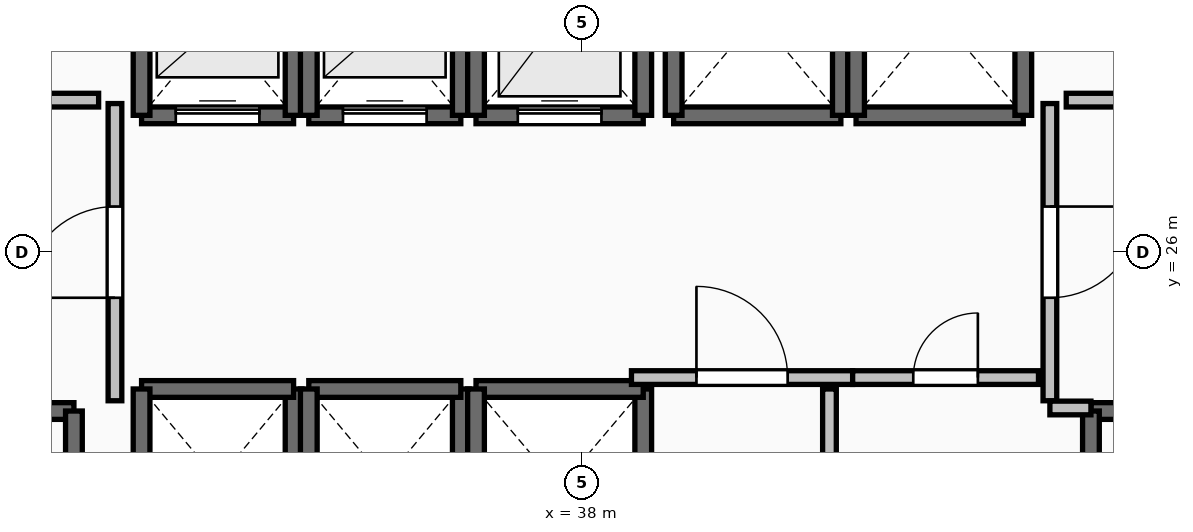
"""IFC4 building model, lengths in metres.
Left out: names, types, materials, properties, quantities, classifications, styles, units other than length and angle.
Written with IfcOpenShell. Run it as: python <this file> out.ifc"""

import sys

from ifc_helpers import new_model, si_unit, direction, frame, frame_2d, origin, place, context, subcontext, project, spatial, rectangle, extrude, element, fill, save


model = new_model("IFC4")
c1 = context("Model", 3, precision=1e-05, world=origin(), true_north=direction((0.0, 1.0)))
c2 = subcontext(c1, "Body", "Model", "MODEL_VIEW")
j1 = project(units=[si_unit("LENGTHUNIT", "METRE"), si_unit("PLANEANGLEUNIT", "RADIAN")], contexts=[c1])
p1 = place(None, origin())
s1 = spatial("IfcSite", under=j1, at=p1, CompositionType="ELEMENT")
p2 = place(p1, origin())
s2 = spatial("IfcBuilding", under=s1, at=p2, CompositionType="ELEMENT")
p3 = place(p2, frame((0.0, 0.0, 52.0)))
s3 = spatial("IfcBuildingStorey", under=s2, at=p3, CompositionType="ELEMENT", Elevation=52.0)
p4 = place(p3, frame((27.94, 23.91, 0.0), z_axis=(0.0, 0.0, 1.0), x_axis=(1.0, 0.0, 0.0)))
e1 = element("IfcWall", 1, at=p4, inside=s3, PredefinedType="SOLIDWALL", context=c2, shape_type="SweptSolid", body=[
    extrude(rectangle(XDim=3.37, YDim=0.22, at=frame_2d((1.685, 0.0))), origin(), (0.0, 0.0, 1.0), 3.24),
])
p5 = place(p4, frame((1.135, 0.0, 0.0)))
e2 = element("IfcOpeningElement", 2, at=p5, cuts=e1, PredefinedType="OPENING", context=c2, shape_type="SweptSolid", body=[
    extrude(rectangle(XDim=1.1, YDim=2.15, at=frame_2d((0.55, 1.075))), frame((0.0, 0.125, 0.0), z_axis=(0.0, -1.0, 0.0), x_axis=(1.0, 0.0, 0.0)), (0.0, 0.0, 1.0), 0.25),
])
p6 = place(p3, frame((31.31, 23.91, 0.0), z_axis=(0.0, 0.0, 1.0), x_axis=(0.0, -1.0, 0.0)))
e3 = element("IfcWall", 3, at=p6, inside=s3, PredefinedType="SOLIDWALL", context=c2, shape_type="SweptSolid", body=[
    extrude(rectangle(XDim=7.42, YDim=0.22, at=frame_2d((3.71, 0.0))), origin(), (0.0, 0.0, 1.0), 3.24),
])
p7 = place(p3, frame((44.69, 23.91, 0.0), z_axis=(0.0, 0.0, 1.0), x_axis=(1.0, 0.0, 0.0)))
e4 = element("IfcWall", 4, at=p7, inside=s3, PredefinedType="SOLIDWALL", context=c2, shape_type="SweptSolid", body=[
    extrude(rectangle(XDim=3.37, YDim=0.22, at=frame_2d((1.685, 0.0))), origin(), (0.0, 0.0, 1.0), 3.24),
])
p8 = place(p7, frame((1.135, 0.0, 0.0)))
e5 = element("IfcOpeningElement", 5, at=p8, cuts=e4, PredefinedType="OPENING", context=c2, shape_type="SweptSolid", body=[
    extrude(rectangle(XDim=1.1, YDim=2.15, at=frame_2d((0.55, 1.075))), frame((0.0, 0.125, 0.0), z_axis=(0.0, -1.0, 0.0), x_axis=(1.0, 0.0, 0.0)), (0.0, 0.0, 1.0), 0.25),
])
p9 = place(p3, frame((44.69, 16.49, 0.0), z_axis=(0.0, 0.0, 1.0), x_axis=(0.0, 1.0, 0.0)))
e6 = element("IfcWall", 6, at=p9, inside=s3, PredefinedType="SOLIDWALL", context=c2, shape_type="SweptSolid", body=[
    extrude(rectangle(XDim=7.42, YDim=0.22, at=frame_2d((3.71, 0.0))), origin(), (0.0, 0.0, 1.0), 3.24),
])
p10 = place(p3, frame((32.2, 27.8, 0.0), z_axis=(0.0, 0.0, 1.0), x_axis=(1.0, 0.0, 0.0)))
e7 = element("IfcWall", 7, at=p10, inside=s3, PredefinedType="SOLIDWALL", context=c2, shape_type="SweptSolid", body=[
    extrude(rectangle(XDim=2.0, YDim=0.22, at=frame_2d((1.0, 0.0))), origin(), (0.0, 0.0, 1.0), 3.24),
])
p11 = place(p10, frame((0.45, 0.0, 0.0)))
e8 = element("IfcOpeningElement", 8, at=p11, cuts=e7, PredefinedType="OPENING", context=c2, shape_type="SweptSolid", body=[
    extrude(rectangle(XDim=1.1, YDim=2.2, at=frame_2d((0.55, 1.1))), frame((0.0, 0.125, 0.0), z_axis=(0.0, -1.0, 0.0), x_axis=(1.0, 0.0, 0.0)), (0.0, 0.0, 1.0), 0.25),
])
for number, where, z_axis, x_axis in (
    (9, (34.2, 27.8, 0.0), (0.0, 0.0, 1.0), (0.0, 1.0, 0.0)),
    (10, (32.2, 30.2, 0.0), (0.0, 0.0, 1.0), (0.0, -1.0, 0.0)),
):
    element("IfcWall", number, at=place(p3, frame(where, z_axis=z_axis, x_axis=x_axis)), inside=s3, PredefinedType="SOLIDWALL", context=c2, shape_type="SweptSolid", body=[
        extrude(rectangle(XDim=2.4, YDim=0.22, at=frame_2d((1.2, 0.0))), origin(), (0.0, 0.0, 1.0), 3.24),
    ])
p12 = place(p3, frame((34.4, 27.8, 0.0), z_axis=(0.0, 0.0, 1.0), x_axis=(1.0, 0.0, 0.0)))
e11 = element("IfcWall", 11, at=p12, inside=s3, PredefinedType="SOLIDWALL", context=c2, shape_type="SweptSolid", body=[
    extrude(rectangle(XDim=2.0, YDim=0.22, at=frame_2d((1.0, 0.0))), origin(), (0.0, 0.0, 1.0), 3.24),
])
p13 = place(p12, frame((0.45, 0.0, 0.0)))
e12 = element("IfcOpeningElement", 12, at=p13, cuts=e11, PredefinedType="OPENING", context=c2, shape_type="SweptSolid", body=[
    extrude(rectangle(XDim=1.1, YDim=2.2, at=frame_2d((0.55, 1.1))), frame((0.0, 0.125, 0.0), z_axis=(0.0, -1.0, 0.0), x_axis=(1.0, 0.0, 0.0)), (0.0, 0.0, 1.0), 0.25),
])
for number, where, z_axis, x_axis in (
    (13, (36.4, 27.8, 0.0), (0.0, 0.0, 1.0), (0.0, 1.0, 0.0)),
    (14, (34.4, 30.2, 0.0), (0.0, 0.0, 1.0), (0.0, -1.0, 0.0)),
):
    element("IfcWall", number, at=place(p3, frame(where, z_axis=z_axis, x_axis=x_axis)), inside=s3, PredefinedType="SOLIDWALL", context=c2, shape_type="SweptSolid", body=[
        extrude(rectangle(XDim=2.4, YDim=0.22, at=frame_2d((1.2, 0.0))), origin(), (0.0, 0.0, 1.0), 3.24),
    ])
p14 = place(p3, frame((36.6, 27.8, 0.0), z_axis=(0.0, 0.0, 1.0), x_axis=(1.0, 0.0, 0.0)))
e15 = element("IfcWall", 15, at=p14, inside=s3, PredefinedType="SOLIDWALL", context=c2, shape_type="SweptSolid", body=[
    extrude(rectangle(XDim=2.2, YDim=0.22, at=frame_2d((1.1, 0.0))), origin(), (0.0, 0.0, 1.0), 3.24),
])
p15 = place(p14, frame((0.55, 0.0, 0.0)))
e16 = element("IfcOpeningElement", 16, at=p15, cuts=e15, PredefinedType="OPENING", context=c2, shape_type="SweptSolid", body=[
    extrude(rectangle(XDim=1.1, YDim=2.2, at=frame_2d((0.55, 1.1))), frame((0.0, 0.125, 0.0), z_axis=(0.0, -1.0, 0.0), x_axis=(1.0, 0.0, 0.0)), (0.0, 0.0, 1.0), 0.25),
])
for number, where, z_axis, x_axis in (
    (17, (38.8, 27.8, 0.0), (0.0, 0.0, 1.0), (0.0, 1.0, 0.0)),
    (18, (36.6, 30.4, 0.0), (0.0, 0.0, 1.0), (0.0, -1.0, 0.0)),
):
    element("IfcWall", number, at=place(p3, frame(where, z_axis=z_axis, x_axis=x_axis)), inside=s3, PredefinedType="SOLIDWALL", context=c2, shape_type="SweptSolid", body=[
        extrude(rectangle(XDim=2.6, YDim=0.22, at=frame_2d((1.3, 0.0))), origin(), (0.0, 0.0, 1.0), 3.24),
    ])
p16 = place(p3, frame((34.2, 21.8, 0.0), z_axis=(0.0, 0.0, 1.0), x_axis=(0.0, 1.0, 0.0)))
e19 = element("IfcWall", 19, at=p16, inside=s3, PredefinedType="SOLIDWALL", context=c2, shape_type="SweptSolid", body=[
    extrude(rectangle(XDim=2.4, YDim=0.22, at=frame_2d((1.2, 0.0))), origin(), (0.0, 0.0, 1.0), 3.24),
])
p17 = place(p3, frame((34.2, 24.2, 0.0), z_axis=(0.0, 0.0, 1.0), x_axis=(-1.0, 0.0, 0.0)))
e20 = element("IfcWall", 20, at=p17, inside=s3, PredefinedType="SOLIDWALL", context=c2, shape_type="SweptSolid", body=[
    extrude(rectangle(XDim=2.0, YDim=0.22, at=frame_2d((1.0, 0.0))), origin(), (0.0, 0.0, 1.0), 3.24),
])
for number, where, z_axis, x_axis in (
    (21, (32.2, 24.2, 0.0), (0.0, 0.0, 1.0), (0.0, -1.0, 0.0)),
    (22, (36.4, 21.8, 0.0), (0.0, 0.0, 1.0), (0.0, 1.0, 0.0)),
):
    element("IfcWall", number, at=place(p3, frame(where, z_axis=z_axis, x_axis=x_axis)), inside=s3, PredefinedType="SOLIDWALL", context=c2, shape_type="SweptSolid", body=[
        extrude(rectangle(XDim=2.4, YDim=0.22, at=frame_2d((1.2, 0.0))), origin(), (0.0, 0.0, 1.0), 3.24),
    ])
p18 = place(p3, frame((36.4, 24.2, 0.0), z_axis=(0.0, 0.0, 1.0), x_axis=(-1.0, 0.0, 0.0)))
e23 = element("IfcWall", 23, at=p18, inside=s3, PredefinedType="SOLIDWALL", context=c2, shape_type="SweptSolid", body=[
    extrude(rectangle(XDim=2.0, YDim=0.22, at=frame_2d((1.0, 0.0))), origin(), (0.0, 0.0, 1.0), 3.24),
])
p19 = place(p3, frame((34.4, 24.2, 0.0), z_axis=(0.0, 0.0, 1.0), x_axis=(0.0, -1.0, 0.0)))
e24 = element("IfcWall", 24, at=p19, inside=s3, PredefinedType="SOLIDWALL", context=c2, shape_type="SweptSolid", body=[
    extrude(rectangle(XDim=2.4, YDim=0.22, at=frame_2d((1.2, 0.0))), origin(), (0.0, 0.0, 1.0), 3.24),
])
p20 = place(p3, frame((38.8, 21.6, 0.0), z_axis=(0.0, 0.0, 1.0), x_axis=(0.0, 1.0, 0.0)))
e25 = element("IfcWall", 25, at=p20, inside=s3, PredefinedType="SOLIDWALL", context=c2, shape_type="SweptSolid", body=[
    extrude(rectangle(XDim=2.6, YDim=0.22, at=frame_2d((1.3, 0.0))), origin(), (0.0, 0.0, 1.0), 3.24),
])
p21 = place(p3, frame((38.8, 24.2, 0.0), z_axis=(0.0, 0.0, 1.0), x_axis=(-1.0, 0.0, 0.0)))
e26 = element("IfcWall", 26, at=p21, inside=s3, PredefinedType="SOLIDWALL", context=c2, shape_type="SweptSolid", body=[
    extrude(rectangle(XDim=2.2, YDim=0.22, at=frame_2d((1.1, 0.0))), origin(), (0.0, 0.0, 1.0), 3.24),
])
p22 = place(p3, frame((36.6, 24.2, 0.0), z_axis=(0.0, 0.0, 1.0), x_axis=(0.0, -1.0, 0.0)))
e27 = element("IfcWall", 27, at=p22, inside=s3, PredefinedType="SOLIDWALL", context=c2, shape_type="SweptSolid", body=[
    extrude(rectangle(XDim=2.6, YDim=0.22, at=frame_2d((1.3, 0.0))), origin(), (0.0, 0.0, 1.0), 3.24),
])
p23 = place(p3, frame((39.2, 27.8, 0.0), z_axis=(0.0, 0.0, 1.0), x_axis=(1.0, 0.0, 0.0)))
e28 = element("IfcWall", 28, at=p23, inside=s3, PredefinedType="SOLIDWALL", context=c2, shape_type="SweptSolid", body=[
    extrude(rectangle(XDim=2.2, YDim=0.22, at=frame_2d((1.1, 0.0))), origin(), (0.0, 0.0, 1.0), 3.24),
])
for number, where, z_axis, x_axis in (
    (29, (41.4, 27.8, 0.0), (0.0, 0.0, 1.0), (0.0, 1.0, 0.0)),
    (30, (39.2, 30.4, 0.0), (0.0, 0.0, 1.0), (0.0, -1.0, 0.0)),
):
    element("IfcWall", number, at=place(p3, frame(where, z_axis=z_axis, x_axis=x_axis)), inside=s3, PredefinedType="SOLIDWALL", context=c2, shape_type="SweptSolid", body=[
        extrude(rectangle(XDim=2.6, YDim=0.22, at=frame_2d((1.3, 0.0))), origin(), (0.0, 0.0, 1.0), 3.24),
    ])
p24 = place(p3, frame((41.6, 27.8, 0.0), z_axis=(0.0, 0.0, 1.0), x_axis=(1.0, 0.0, 0.0)))
e31 = element("IfcWall", 31, at=p24, inside=s3, PredefinedType="SOLIDWALL", context=c2, shape_type="SweptSolid", body=[
    extrude(rectangle(XDim=2.2, YDim=0.22, at=frame_2d((1.1, 0.0))), origin(), (0.0, 0.0, 1.0), 3.24),
])
for number, where, z_axis, x_axis in (
    (32, (43.8, 27.8, 0.0), (0.0, 0.0, 1.0), (0.0, 1.0, 0.0)),
    (33, (41.6, 30.4, 0.0), (0.0, 0.0, 1.0), (0.0, -1.0, 0.0)),
):
    element("IfcWall", number, at=place(p3, frame(where, z_axis=z_axis, x_axis=x_axis)), inside=s3, PredefinedType="SOLIDWALL", context=c2, shape_type="SweptSolid", body=[
        extrude(rectangle(XDim=2.6, YDim=0.22, at=frame_2d((1.3, 0.0))), origin(), (0.0, 0.0, 1.0), 3.24),
    ])
p25 = place(p3, frame((31.85, 24.045, 0.0), z_axis=(0.0, 0.0, 1.0), x_axis=(0.0, 1.0, 0.0)))
e34 = element("IfcWall", 34, at=p25, inside=s3, PredefinedType="PARTITIONING", context=c2, shape_type="SweptSolid", body=[
    extrude(rectangle(XDim=3.91, YDim=0.18, at=frame_2d((1.955, 0.0))), origin(), (0.0, 0.0, 1.0), 3.24),
])
p26 = place(p25, frame((1.355, 0.0, 0.0)))
e35 = element("IfcOpeningElement", 35, at=p26, cuts=e34, PredefinedType="OPENING", context=c2, shape_type="SweptSolid", body=[
    extrude(rectangle(XDim=1.2, YDim=2.15, at=frame_2d((0.6, 1.075))), frame((0.0, 0.105, 0.0), z_axis=(0.0, -1.0, 0.0), x_axis=(1.0, 0.0, 0.0)), (0.0, 0.0, 1.0), 0.21),
])
p27 = place(p3, frame((44.15, 27.955, 0.0), z_axis=(0.0, 0.0, 1.0), x_axis=(0.0, -1.0, 0.0)))
e36 = element("IfcWall", 36, at=p27, inside=s3, PredefinedType="PARTITIONING", context=c2, shape_type="SweptSolid", body=[
    extrude(rectangle(XDim=3.91, YDim=0.18, at=frame_2d((1.955, 0.0))), origin(), (0.0, 0.0, 1.0), 3.24),
])
p28 = place(p27, frame((1.355, 0.0, 0.0)))
e37 = element("IfcOpeningElement", 37, at=p28, cuts=e36, PredefinedType="OPENING", context=c2, shape_type="SweptSolid", body=[
    extrude(rectangle(XDim=1.2, YDim=2.15, at=frame_2d((0.6, 1.075))), frame((0.0, 0.105, 0.0), z_axis=(0.0, -1.0, 0.0), x_axis=(1.0, 0.0, 0.0)), (0.0, 0.0, 1.0), 0.21),
])
p29 = place(p3, frame((44.15, 23.95, 0.0), z_axis=(0.0, 0.0, 1.0), x_axis=(1.0, 0.0, 0.0)))
e38 = element("IfcWall", 38, at=p29, inside=s3, PredefinedType="PARTITIONING", context=c2, shape_type="SweptSolid", body=[
    extrude(rectangle(XDim=0.54, YDim=0.18, at=frame_2d((0.27, 0.0))), origin(), (0.0, 0.0, 1.0), 3.24),
])
p30 = place(p3, frame((38.645, 24.35, 0.0), z_axis=(0.0, 0.0, 1.0), x_axis=(1.0, 0.0, 0.0)))
e39 = element("IfcWall", 39, at=p30, inside=s3, PredefinedType="PARTITIONING", context=c2, shape_type="SweptSolid", body=[
    extrude(rectangle(XDim=2.91, YDim=0.18, at=frame_2d((1.455, 0.0))), origin(), (0.0, 0.0, 1.0), 3.24),
])
p31 = place(p30, frame((0.855, 0.0, 0.0)))
e40 = element("IfcOpeningElement", 40, at=p31, cuts=e39, PredefinedType="OPENING", context=c2, shape_type="SweptSolid", body=[
    extrude(rectangle(XDim=1.2, YDim=2.15, at=frame_2d((0.6, 1.075))), frame((0.0, 0.105, 0.0), z_axis=(0.0, -1.0, 0.0), x_axis=(1.0, 0.0, 0.0)), (0.0, 0.0, 1.0), 0.21),
])
p32 = place(p3, frame((41.555, 24.35, 0.0), z_axis=(0.0, 0.0, 1.0), x_axis=(1.0, 0.0, 0.0)))
e41 = element("IfcWall", 41, at=p32, inside=s3, PredefinedType="PARTITIONING", context=c2, shape_type="SweptSolid", body=[
    extrude(rectangle(XDim=2.445, YDim=0.18, at=frame_2d((1.223, 0.0))), origin(), (0.0, 0.0, 1.0), 3.24),
])
p33 = place(p32, frame((0.798, 0.0, 0.0)))
e42 = element("IfcOpeningElement", 42, at=p33, cuts=e41, PredefinedType="OPENING", context=c2, shape_type="SweptSolid", body=[
    extrude(rectangle(XDim=0.85, YDim=2.1, at=frame_2d((0.425, 1.05))), frame((0.0, 0.105, 0.0), z_axis=(0.0, -1.0, 0.0), x_axis=(1.0, 0.0, 0.0)), (0.0, 0.0, 1.0), 0.21),
])
p34 = place(p3, frame((41.25, 20.305, 0.0), z_axis=(0.0, 0.0, 1.0), x_axis=(0.0, 1.0, 0.0)))
e43 = element("IfcWall", 43, at=p34, inside=s3, PredefinedType="PARTITIONING", context=c2, shape_type="SweptSolid", body=[
    extrude(rectangle(XDim=3.895, YDim=0.18, at=frame_2d((1.948, 0.0))), origin(), (0.0, 0.0, 1.0), 3.24),
])
p35 = place(p34, frame((1.522, 0.0, 0.0)))
e44 = element("IfcOpeningElement", 44, at=p35, cuts=e43, PredefinedType="OPENING", context=c2, shape_type="SweptSolid", body=[
    extrude(rectangle(XDim=0.85, YDim=2.1, at=frame_2d((0.425, 1.05))), frame((0.0, 0.105, 0.0), z_axis=(0.0, -1.0, 0.0), x_axis=(1.0, 0.0, 0.0)), (0.0, 0.0, 1.0), 0.21),
])
for number, where, z_axis, x_axis in (
    (45, (31.635, 28.0, 0.0), (0.0, 0.0, 1.0), (-1.0, 0.0, 0.0)),
    (46, (45.28, 28.0, 0.0), (0.0, 0.0, 1.0), (-1.0, 0.0, 0.0)),
):
    element("IfcWall", number, at=place(p3, frame(where, z_axis=z_axis, x_axis=x_axis)), inside=s3, PredefinedType="PARTITIONING", context=c2, shape_type="SweptSolid", body=[
        extrude(rectangle(XDim=0.915, YDim=0.18, at=frame_2d((0.458, 0.0))), origin(), (0.0, 0.0, 1.0), 3.24),
    ])
p36 = place(p11, origin())
e47 = element("IfcDoor", 47, at=p36, inside=s3, OperationType="SLIDING_TO_LEFT", PredefinedType="DOOR", context=c2, shape_type="SweptSolid", body=[
    extrude(rectangle(XDim=1.1, YDim=2.2, at=frame_2d((0.55, 1.1))), frame((0.0, 0.025, 0.0), z_axis=(0.0, -1.0, 0.0), x_axis=(1.0, 0.0, 0.0)), (0.0, 0.0, 1.0), 0.05),
])
fill(e8, e47)
p37 = place(p13, origin())
e48 = element("IfcDoor", 48, at=p37, inside=s3, OperationType="SLIDING_TO_LEFT", PredefinedType="DOOR", context=c2, shape_type="SweptSolid", body=[
    extrude(rectangle(XDim=1.1, YDim=2.2, at=frame_2d((0.55, 1.1))), frame((0.0, 0.025, 0.0), z_axis=(0.0, -1.0, 0.0), x_axis=(1.0, 0.0, 0.0)), (0.0, 0.0, 1.0), 0.05),
])
fill(e12, e48)
p38 = place(p15, origin())
e49 = element("IfcDoor", 49, at=p38, inside=s3, OperationType="SLIDING_TO_LEFT", PredefinedType="DOOR", context=c2, shape_type="SweptSolid", body=[
    extrude(rectangle(XDim=1.1, YDim=2.2, at=frame_2d((0.55, 1.1))), frame((0.0, 0.025, 0.0), z_axis=(0.0, -1.0, 0.0), x_axis=(1.0, 0.0, 0.0)), (0.0, 0.0, 1.0), 0.05),
])
fill(e16, e49)
p39 = place(p26, origin())
e50 = element("IfcDoor", 50, at=p39, inside=s3, OperationType="SINGLE_SWING_LEFT", PredefinedType="DOOR", context=c2, shape_type="SweptSolid", body=[
    extrude(rectangle(XDim=1.2, YDim=2.15, at=frame_2d((0.6, 1.075))), frame((0.0, 0.025, 0.0), z_axis=(0.0, -1.0, 0.0), x_axis=(1.0, 0.0, 0.0)), (0.0, 0.0, 1.0), 0.05),
])
fill(e35, e50)
p40 = place(p28, origin())
e51 = element("IfcDoor", 51, at=p40, inside=s3, OperationType="SINGLE_SWING_LEFT", PredefinedType="DOOR", context=c2, shape_type="SweptSolid", body=[
    extrude(rectangle(XDim=1.2, YDim=2.15, at=frame_2d((0.6, 1.075))), frame((0.0, 0.025, 0.0), z_axis=(0.0, -1.0, 0.0), x_axis=(1.0, 0.0, 0.0)), (0.0, 0.0, 1.0), 0.05),
])
fill(e37, e51)
p41 = place(p31, origin())
e52 = element("IfcDoor", 52, at=p41, inside=s3, OperationType="SINGLE_SWING_LEFT", PredefinedType="DOOR", context=c2, shape_type="SweptSolid", body=[
    extrude(rectangle(XDim=1.2, YDim=2.15, at=frame_2d((0.6, 1.075))), frame((0.0, 0.025, 0.0), z_axis=(0.0, -1.0, 0.0), x_axis=(1.0, 0.0, 0.0)), (0.0, 0.0, 1.0), 0.05),
])
fill(e40, e52)
p42 = place(p33, origin())
e53 = element("IfcDoor", 53, at=p42, inside=s3, OperationType="SINGLE_SWING_RIGHT", PredefinedType="DOOR", context=c2, shape_type="SweptSolid", body=[
    extrude(rectangle(XDim=0.85, YDim=2.1, at=frame_2d((0.425, 1.05))), frame((0.0, 0.025, 0.0), z_axis=(0.0, -1.0, 0.0), x_axis=(1.0, 0.0, 0.0)), (0.0, 0.0, 1.0), 0.05),
])
fill(e42, e53)
save(model, sys.argv[1])
